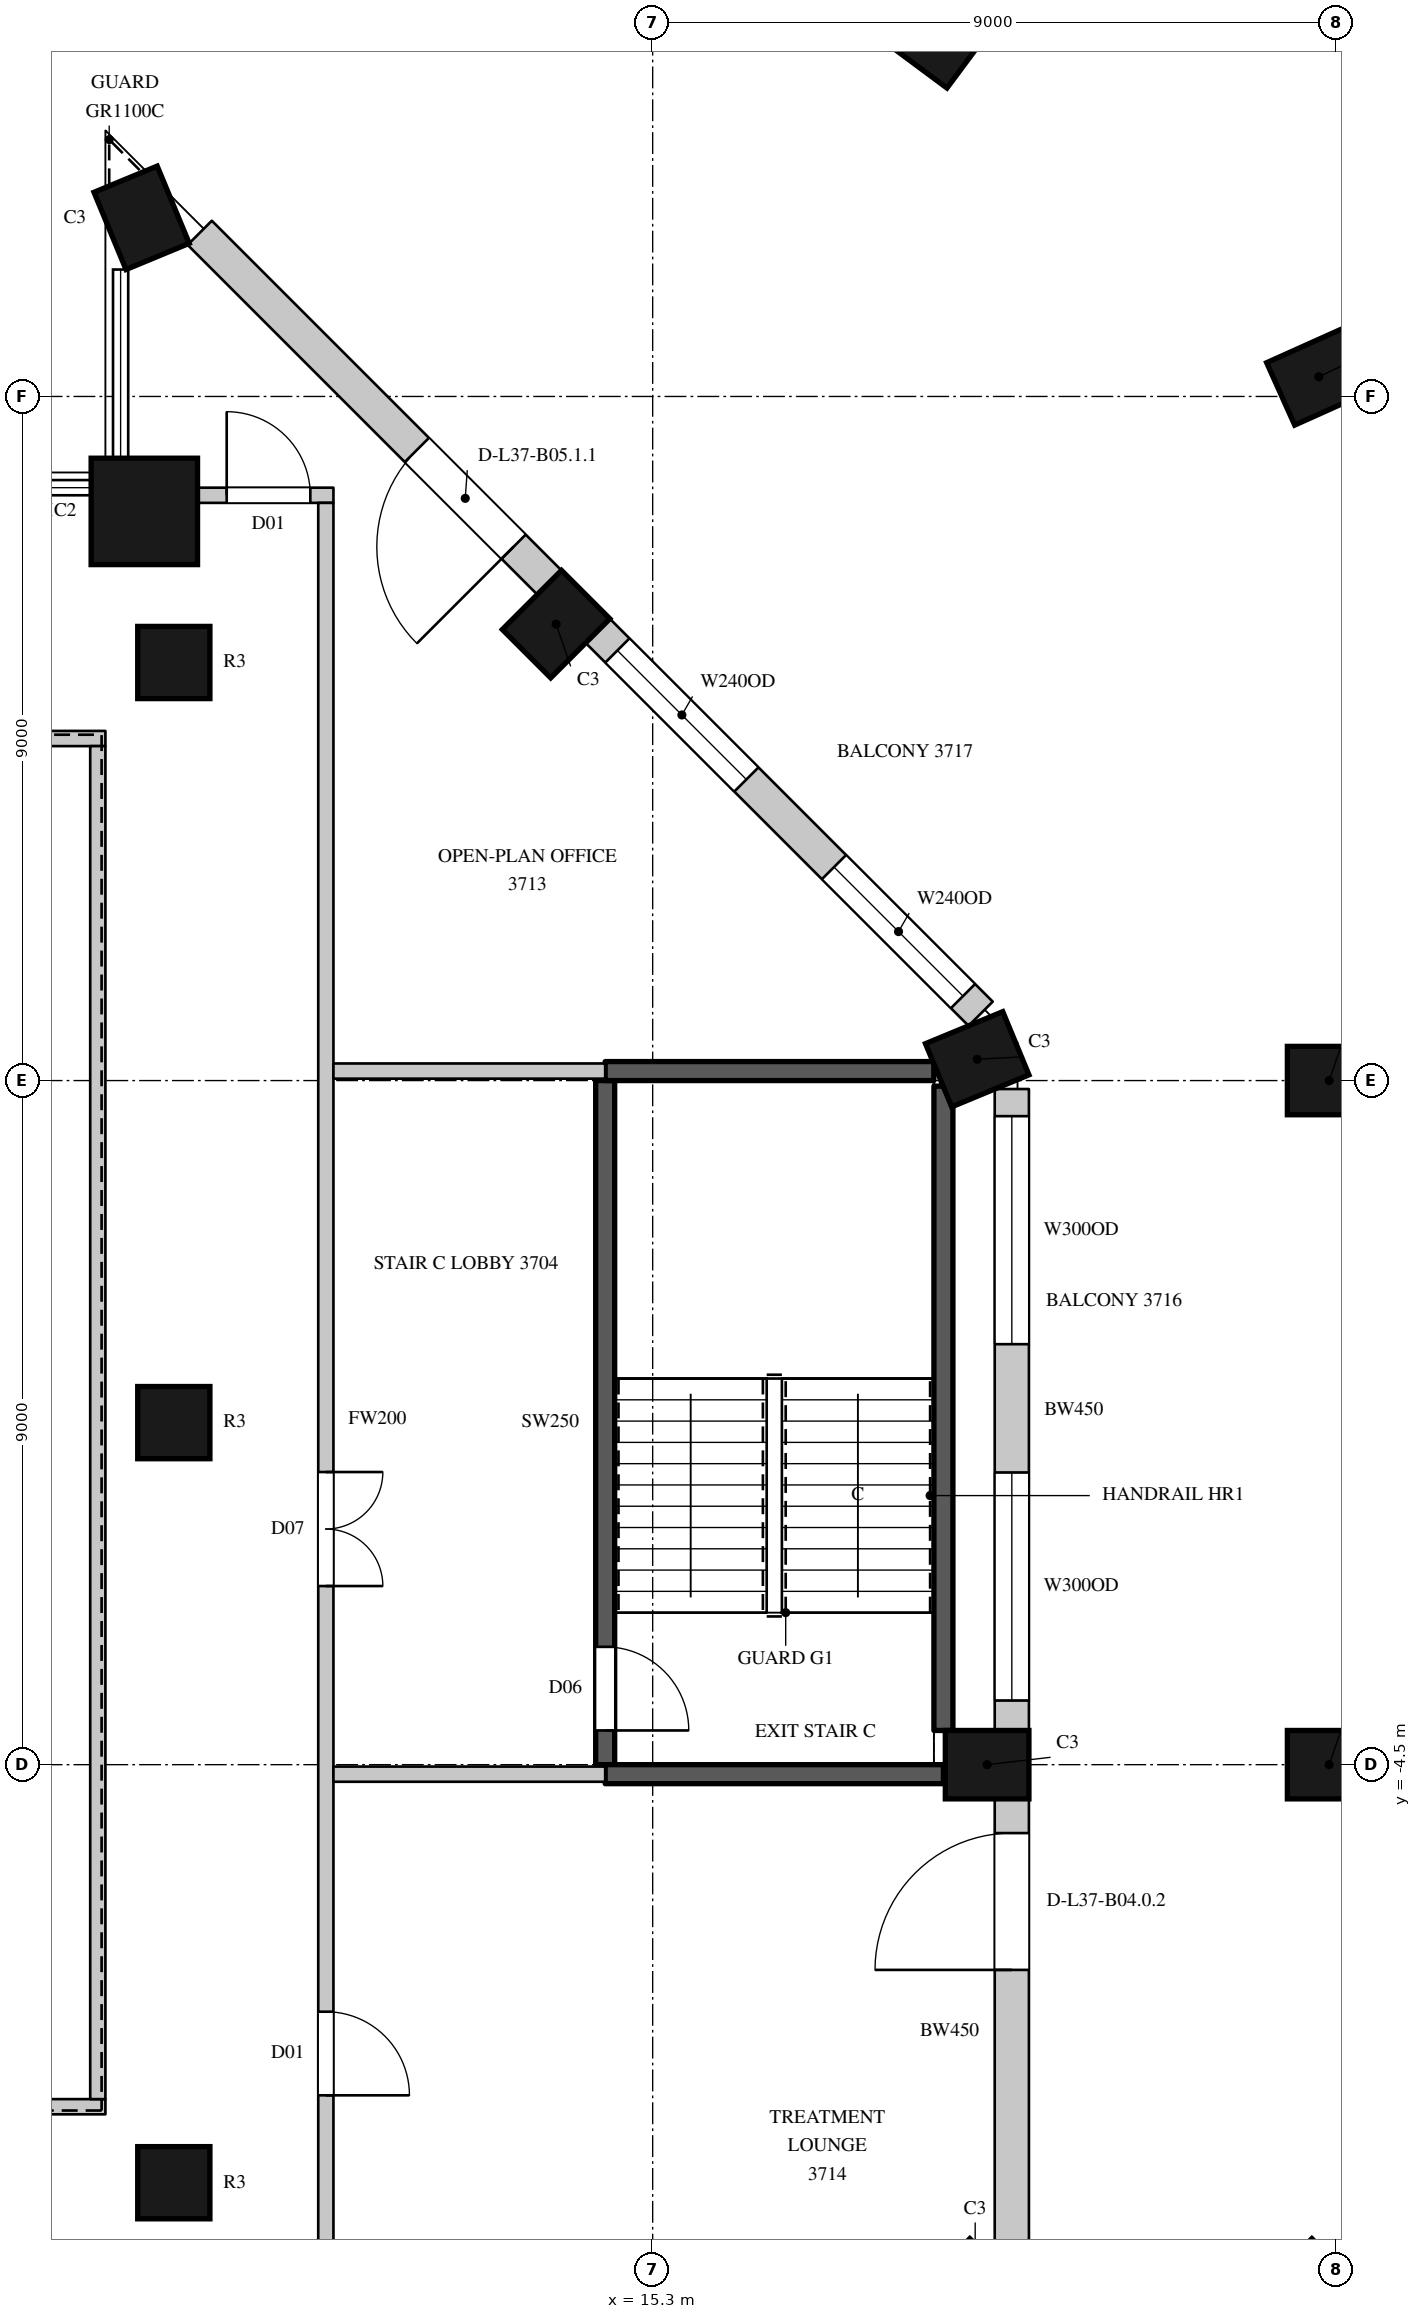
"""IFC4 building model, lengths in metres.
Left out: names, types, materials, properties, quantities, classifications, styles, units other than length and angle.
Written with IfcOpenShell. Run it as: python <this file> out.ifc"""

import sys

from ifc_helpers import new_model, si_unit, direction, frame, frame_2d, origin, origin_2d, place, context, subcontext, project, spatial, rectangle, circle, extrude, element, fill, save


model = new_model("IFC4")
c1 = context("Model", 3, precision=1e-05, world=origin(), true_north=direction((0.0, 1.0)))
c2 = subcontext(c1, "Body", "Model", "MODEL_VIEW")
j1 = project(units=[si_unit("LENGTHUNIT", "METRE"), si_unit("PLANEANGLEUNIT", "RADIAN")], contexts=[c1])
p1 = place(None, origin())
s1 = spatial("IfcSite", under=j1, at=p1, CompositionType="ELEMENT")
p2 = place(p1, origin())
s2 = spatial("IfcBuilding", under=s1, at=p2, CompositionType="ELEMENT")
p3 = place(p2, frame((0.0, 0.0, 172.8)))
s3 = spatial("IfcBuildingStorey", under=s2, at=p3, CompositionType="ELEMENT", Elevation=172.8)
for number, where, z_axis, x_axis in (
    (1, (19.543, -11.443, 0.0), (0.0, 0.0, 1.0), (0.707, 0.707, 0.0)),
    (2, (19.7, -4.5, 0.0), (0.0, 0.0, 1.0), (0.0, 1.0, 0.0)),
    (3, (19.57, 4.78, 0.0), (0.0, 0.0, 1.0), (-0.383, 0.924, 0.0)),
    (4, (14.029, 10.505, 0.0), (0.0, 0.0, 1.0), (-0.707, 0.707, 0.0)),
    (5, (8.576, 15.85, 0.0), (0.0, 0.0, 1.0), (-0.924, -0.383, 0.0)),
):
    element("IfcColumn", number, at=place(p3, frame(where, z_axis=z_axis, x_axis=x_axis)), inside=s3, PredefinedType="COLUMN", context=c2, shape_type="SweptSolid", body=[
        extrude(rectangle(XDim=0.9, YDim=1.1, at=origin_2d()), origin(), (0.0, 0.0, 1.0), 4.1),
    ])
p4 = place(p3, frame((8.612, 11.988, 0.0), z_axis=(0.0, 0.0, 1.0), x_axis=(1.0, 0.0, 0.0)))
e6 = element("IfcColumn", 6, at=p4, inside=s3, PredefinedType="COLUMN", context=c2, shape_type="SweptSolid", body=[
    extrude(circle(Radius=0.7, at=origin_2d()), origin(), (0.0, 0.0, 1.0), 4.1),
])
for number, where, z_axis, x_axis in (
    (7, (24.043, -11.443, 0.0), (0.0, 0.0, 1.0), (0.707, 0.707, 0.0)),
    (8, (24.2, -4.5, 0.0), (0.0, 0.0, 1.0), (0.0, 1.0, 0.0)),
    (9, (24.2, 4.5, 0.0), (0.0, 0.0, 1.0), (0.0, 1.0, 0.0)),
    (10, (24.064, 13.759, 0.0), (0.0, 0.0, 1.0), (-0.41, 0.912, 0.0)),
    (11, (19.138, 18.268, 0.0), (0.0, 0.0, 1.0), (-0.803, 0.596, 0.0)),
):
    element("IfcColumn", number, at=place(p3, frame(where, z_axis=z_axis, x_axis=x_axis)), inside=s3, PredefinedType="COLUMN", context=c2, shape_type="SweptSolid", body=[
        extrude(rectangle(XDim=0.9, YDim=1.1, at=origin_2d()), origin(), (0.0, 0.0, 1.0), 4.1),
    ])
for number, where, z_axis, x_axis in (
    (12, (9.0, -10.0, 0.0), (0.0, 0.0, 1.0), (1.0, 0.0, 0.0)),
    (13, (9.0, 0.0, 0.0), (0.0, 0.0, 1.0), (1.0, 0.0, 0.0)),
    (14, (9.0, 10.0, 0.0), (0.0, 0.0, 1.0), (1.0, 0.0, 0.0)),
):
    element("IfcColumn", number, at=place(p3, frame(where, z_axis=z_axis, x_axis=x_axis)), inside=s3, PredefinedType="COLUMN", context=c2, shape_type="SweptSolid", body=[
        extrude(circle(Radius=0.475, at=origin_2d()), origin(), (0.0, 0.0, 1.0), 4.1),
    ])
p5 = place(p3, frame((20.025, -11.064, 0.0), z_axis=(0.0, 0.0, 1.0), x_axis=(0.0, 1.0, 0.0)))
e15 = element("IfcWall", 15, at=p5, inside=s3, PredefinedType="SOLIDWALL", context=c2, shape_type="SweptSolid", body=[
    extrude(rectangle(XDim=6.114, YDim=0.45, at=frame_2d((3.057, 0.0))), origin(), (0.0, 0.0, 1.0), 3.8),
])
p6 = place(p5, frame((3.864, 0.0, 0.0)))
e16 = element("IfcOpeningElement", 16, at=p6, cuts=e15, PredefinedType="OPENING", context=c2, shape_type="SweptSolid", body=[
    extrude(rectangle(XDim=1.8, YDim=2.4, at=frame_2d((0.9, 1.2))), frame((0.0, 0.235, 0.0), z_axis=(0.0, -1.0, 0.0), x_axis=(1.0, 0.0, 0.0)), (0.0, 0.0, 1.0), 0.47),
])
p7 = place(p3, frame((20.025, -4.05, 0.0), z_axis=(0.0, 0.0, 1.0), x_axis=(0.0, 1.0, 0.0)))
e17 = element("IfcWall", 17, at=p7, inside=s3, PredefinedType="SOLIDWALL", context=c2, shape_type="SweptSolid", body=[
    extrude(rectangle(XDim=8.439, YDim=0.45, at=frame_2d((4.219, 0.0))), origin(), (0.0, 0.0, 1.0), 3.8),
])
p8 = place(p7, frame((0.394, 0.0, 1.05)))
e18 = element("IfcOpeningElement", 18, at=p8, cuts=e17, PredefinedType="OPENING", context=c2, shape_type="SweptSolid", body=[
    extrude(rectangle(XDim=3.0, YDim=2.4, at=frame_2d((1.5, 1.2))), frame((0.0, 0.235, 0.0), z_axis=(0.0, -1.0, 0.0), x_axis=(1.0, 0.0, 0.0)), (0.0, 0.0, 1.0), 0.47),
])
p9 = place(p7, frame((5.082, 0.0, 1.05)))
e19 = element("IfcOpeningElement", 19, at=p9, cuts=e17, PredefinedType="OPENING", context=c2, shape_type="SweptSolid", body=[
    extrude(rectangle(XDim=3.0, YDim=2.4, at=frame_2d((1.5, 1.2))), frame((0.0, 0.235, 0.0), z_axis=(0.0, -1.0, 0.0), x_axis=(1.0, 0.0, 0.0)), (0.0, 0.0, 1.0), 0.47),
])
p10 = place(p3, frame((19.615, 5.379, 0.0), z_axis=(0.0, 0.0, 1.0), x_axis=(-0.707089646058, 0.7071239159, 0.0)))
e20 = element("IfcWall", 20, at=p10, inside=s3, PredefinedType="SOLIDWALL", context=c2, shape_type="SweptSolid", body=[
    extrude(rectangle(XDim=7.124, YDim=0.45, at=frame_2d((3.562, 0.0))), origin(), (0.0, 0.0, 1.0), 3.8),
])
p11 = place(p10, frame((0.328, 0.0, 1.05)))
e21 = element("IfcOpeningElement", 21, at=p11, cuts=e20, PredefinedType="OPENING", context=c2, shape_type="SweptSolid", body=[
    extrude(rectangle(XDim=2.4, YDim=2.4, at=frame_2d((1.2, 1.2))), frame((0.0, 0.235, 0.0), z_axis=(0.0, -1.0, 0.0), x_axis=(1.0, 0.0, 0.0)), (0.0, 0.0, 1.0), 0.47),
])
p12 = place(p10, frame((4.359, 0.0, 1.05)))
e22 = element("IfcOpeningElement", 22, at=p12, cuts=e20, PredefinedType="OPENING", context=c2, shape_type="SweptSolid", body=[
    extrude(rectangle(XDim=2.4, YDim=2.4, at=frame_2d((1.2, 1.2))), frame((0.0, 0.235, 0.0), z_axis=(0.0, -1.0, 0.0), x_axis=(1.0, 0.0, 0.0)), (0.0, 0.0, 1.0), 0.47),
])
p13 = place(p3, frame((13.941, 11.053, 0.0), z_axis=(0.0, 0.0, 1.0), x_axis=(-0.707106781187, 0.707106781187, 0.0)))
e23 = element("IfcWall", 23, at=p13, inside=s3, PredefinedType="SOLIDWALL", context=c2, shape_type="SweptSolid", body=[
    extrude(rectangle(XDim=6.505, YDim=0.45, at=frame_2d((3.252, 0.0))), origin(), (0.0, 0.0, 1.0), 3.8),
])
p14 = place(p13, frame((0.665, 0.0, 0.0)))
e24 = element("IfcOpeningElement", 24, at=p14, cuts=e23, PredefinedType="OPENING", context=c2, shape_type="SweptSolid", body=[
    extrude(rectangle(XDim=1.8, YDim=2.4, at=frame_2d((0.9, 1.2))), frame((0.0, 0.235, 0.0), z_axis=(0.0, -1.0, 0.0), x_axis=(1.0, 0.0, 0.0)), (0.0, 0.0, 1.0), 0.47),
])
p15 = place(p3, frame((21.1, -5.1, 0.0), z_axis=(0.0, 0.0, 1.0), x_axis=(0.0, 1.0, 0.0)))
e25 = element("IfcWall", 25, at=p15, inside=s3, PredefinedType="SOLIDWALL", context=c2, shape_type="SweptSolid", body=[
    extrude(rectangle(XDim=3.583, YDim=0.45, at=frame_2d((1.792, 0.0))), origin(), (0.0, 0.0, 1.0), 0.6),
])
p16 = place(p3, frame((21.1, -0.617, 0.0), z_axis=(0.0, 0.0, 1.0), x_axis=(0.0, 1.0, 0.0)))
e26 = element("IfcWall", 26, at=p16, inside=s3, PredefinedType="SOLIDWALL", context=c2, shape_type="SweptSolid", body=[
    extrude(rectangle(XDim=2.567, YDim=0.45, at=frame_2d((1.283, 0.0))), origin(), (0.0, 0.0, 1.0), 0.6),
])
p17 = place(p3, frame((18.65, 7.864, 0.0), z_axis=(0.0, 0.0, 1.0), x_axis=(-0.707059037574, 0.707154521576, 0.0)))
e27 = element("IfcWall", 27, at=p17, inside=s3, PredefinedType="SOLIDWALL", context=c2, shape_type="SweptSolid", body=[
    extrude(rectangle(XDim=2.557, YDim=0.45, at=frame_2d((1.278, 0.0))), origin(), (0.0, 0.0, 1.0), 0.6),
])
p18 = place(p3, frame((16.206, 10.308, 0.0), z_axis=(0.0, 0.0, 1.0), x_axis=(-0.707057827829, 0.707155731156, 0.0)))
e28 = element("IfcWall", 28, at=p18, inside=s3, PredefinedType="SOLIDWALL", context=c2, shape_type="SweptSolid", body=[
    extrude(rectangle(XDim=2.494, YDim=0.45, at=frame_2d((1.247, 0.0))), origin(), (0.0, 0.0, 1.0), 0.6),
])
p19 = place(p3, frame((12.251, 14.263, 0.0), z_axis=(0.0, 0.0, 1.0), x_axis=(-0.707039709166, 0.707173846846, 0.0)))
e29 = element("IfcWall", 29, at=p19, inside=s3, PredefinedType="SOLIDWALL", context=c2, shape_type="SweptSolid", body=[
    extrude(rectangle(XDim=1.82, YDim=0.45, at=frame_2d((0.91, 0.0))), origin(), (0.0, 0.0, 1.0), 0.6),
])
for number, where, z_axis, x_axis in (
    (30, (-2.48, -9.0, 0.0), (0.0, 0.0, 1.0), (1.0, 0.0, 0.0)),
    (31, (-2.48, 9.0, 0.0), (0.0, 0.0, 1.0), (1.0, 0.0, 0.0)),
):
    element("IfcWall", number, at=place(p3, frame(where, z_axis=z_axis, x_axis=x_axis)), inside=s3, PredefinedType="PARTITIONING", context=c2, shape_type="SweptSolid", body=[
        extrude(rectangle(XDim=10.58, YDim=0.2, at=frame_2d((5.29, 0.0))), origin(), (0.0, 0.0, 1.0), 3.8),
    ])
p20 = place(p3, frame((8.0, -8.9, 0.0), z_axis=(0.0, 0.0, 1.0), x_axis=(0.0, 1.0, 0.0)))
e32 = element("IfcWall", 32, at=p20, inside=s3, PredefinedType="PARTITIONING", context=c2, shape_type="SweptSolid", body=[
    extrude(rectangle(XDim=17.8, YDim=0.2, at=frame_2d((8.9, 0.0))), origin(), (0.0, 0.0, 1.0), 3.8),
])
p21 = place(p3, frame((9.296, 12.2, 0.0), z_axis=(0.0, 0.0, 1.0), x_axis=(1.0, 0.0, 0.0)))
e33 = element("IfcWall", 33, at=p21, inside=s3, PredefinedType="PARTITIONING", context=c2, shape_type="SweptSolid", body=[
    extrude(rectangle(XDim=1.804, YDim=0.2, at=frame_2d((0.902, 0.0))), origin(), (0.0, 0.0, 1.0), 3.8),
])
p22 = place(p21, frame((0.4, 0.0, 0.0)))
e34 = element("IfcOpeningElement", 34, at=p22, cuts=e33, PredefinedType="OPENING", context=c2, shape_type="SweptSolid", body=[
    extrude(rectangle(XDim=1.1, YDim=2.4, at=frame_2d((0.55, 1.2))), frame((0.0, 0.11, 0.0), z_axis=(0.0, -1.0, 0.0), x_axis=(1.0, 0.0, 0.0)), (0.0, 0.0, 1.0), 0.22),
])
p23 = place(p3, frame((11.0, -12.0, 0.0), z_axis=(0.0, 0.0, 1.0), x_axis=(0.0, 1.0, 0.0)))
e35 = element("IfcWall", 35, at=p23, inside=s3, PredefinedType="PARTITIONING", context=c2, shape_type="SweptSolid", body=[
    extrude(rectangle(XDim=24.1, YDim=0.2, at=frame_2d((12.05, 0.0))), origin(), (0.0, 0.0, 1.0), 3.8),
])
p24 = place(p23, frame((9.85, 0.0, 0.0)))
e36 = element("IfcOpeningElement", 36, at=p24, cuts=e35, PredefinedType="OPENING", context=c2, shape_type="SweptSolid", body=[
    extrude(rectangle(XDim=1.5, YDim=2.4, at=frame_2d((0.75, 1.2))), frame((0.0, 0.11, 0.0), z_axis=(0.0, -1.0, 0.0), x_axis=(1.0, 0.0, 0.0)), (0.0, 0.0, 1.0), 0.22),
])
p25 = place(p23, frame((3.15, 0.0, 0.0)))
e37 = element("IfcOpeningElement", 37, at=p25, cuts=e35, PredefinedType="OPENING", context=c2, shape_type="SweptSolid", body=[
    extrude(rectangle(XDim=1.1, YDim=2.4, at=frame_2d((0.55, 1.2))), frame((0.0, 0.11, 0.0), z_axis=(0.0, -1.0, 0.0), x_axis=(1.0, 0.0, 0.0)), (0.0, 0.0, 1.0), 0.22),
])
for number, where, z_axis, x_axis in (
    (38, (11.1, -4.625, 0.0), (0.0, 0.0, 1.0), (1.0, 0.0, 0.0)),
    (39, (11.1, 4.625, 0.0), (0.0, 0.0, 1.0), (1.0, 0.0, 0.0)),
):
    element("IfcWall", number, at=place(p3, frame(where, z_axis=z_axis, x_axis=x_axis)), inside=s3, PredefinedType="PARTITIONING", context=c2, shape_type="SweptSolid", body=[
        extrude(rectangle(XDim=3.575, YDim=0.2, at=frame_2d((1.788, 0.0))), origin(), (0.0, 0.0, 1.0), 3.8),
    ])
p26 = place(p3, frame((14.675, -4.5, 0.0), z_axis=(0.0, 0.0, 1.0), x_axis=(0.0, 1.0, 0.0)))
e40 = element("IfcWall", 40, at=p26, inside=s3, PredefinedType="SHEAR", context=c2, shape_type="SweptSolid", body=[
    extrude(rectangle(XDim=9.0, YDim=0.25, at=frame_2d((4.5, 0.0))), origin(), (0.0, 0.0, 1.0), 3.8),
])
p27 = place(p26, frame((0.45, 0.0, 0.0)))
e41 = element("IfcOpeningElement", 41, at=p27, cuts=e40, PredefinedType="OPENING", context=c2, shape_type="SweptSolid", body=[
    extrude(rectangle(XDim=1.1, YDim=2.2, at=frame_2d((0.55, 1.1))), frame((0.0, 0.135, 0.0), z_axis=(0.0, -1.0, 0.0), x_axis=(1.0, 0.0, 0.0)), (0.0, 0.0, 1.0), 0.27),
])
p28 = place(p3, frame((14.675, -4.625, 0.0), z_axis=(0.0, 0.0, 1.0), x_axis=(1.0, 0.0, 0.0)))
e42 = element("IfcWall", 42, at=p28, inside=s3, PredefinedType="SHEAR", context=c2, shape_type="SweptSolid", body=[
    extrude(rectangle(XDim=4.45, YDim=0.25, at=frame_2d((2.225, 0.0))), origin(), (0.0, 0.0, 1.0), 3.8),
])
p29 = place(p3, frame((14.675, 4.625, 0.0), z_axis=(0.0, 0.0, 1.0), x_axis=(1.0, 0.0, 0.0)))
e43 = element("IfcWall", 43, at=p29, inside=s3, PredefinedType="SHEAR", context=c2, shape_type="SweptSolid", body=[
    extrude(rectangle(XDim=4.324, YDim=0.25, at=frame_2d((2.162, 0.0))), origin(), (0.0, 0.0, 1.0), 3.8),
])
p30 = place(p3, frame((19.125, -4.05, 0.0), z_axis=(0.0, 0.0, 1.0), x_axis=(0.0, 1.0, 0.0)))
e44 = element("IfcWall", 44, at=p30, inside=s3, PredefinedType="SHEAR", context=c2, shape_type="SweptSolid", body=[
    extrude(rectangle(XDim=8.477, YDim=0.25, at=frame_2d((4.238, 0.0))), origin(), (0.0, 0.0, 1.0), 3.8),
])
p31 = place(p6, origin())
e45 = element("IfcDoor", 45, at=p31, inside=s3, OperationType="SLIDING_TO_LEFT", PredefinedType="DOOR", context=c2, shape_type="SweptSolid", body=[
    extrude(rectangle(XDim=1.8, YDim=2.4, at=frame_2d((0.9, 1.2))), frame((0.0, 0.13, 0.0), z_axis=(0.0, -1.0, 0.0), x_axis=(1.0, 0.0, 0.0)), (0.0, 0.0, 1.0), 0.05),
])
fill(e16, e45)
p32 = place(p8, origin())
e46 = element("IfcWindow", 46, at=p32, inside=s3, PartitioningType="SINGLE_PANEL", PredefinedType="WINDOW", context=c2, shape_type="SweptSolid", body=[
    extrude(rectangle(XDim=3.0, YDim=2.4, at=frame_2d((1.5, 1.2))), frame((0.0, 0.135, 0.0), z_axis=(0.0, -1.0, 0.0), x_axis=(1.0, 0.0, 0.0)), (0.0, 0.0, 1.0), 0.06),
])
fill(e18, e46)
p33 = place(p9, origin())
e47 = element("IfcWindow", 47, at=p33, inside=s3, PartitioningType="SINGLE_PANEL", PredefinedType="WINDOW", context=c2, shape_type="SweptSolid", body=[
    extrude(rectangle(XDim=3.0, YDim=2.4, at=frame_2d((1.5, 1.2))), frame((0.0, 0.135, 0.0), z_axis=(0.0, -1.0, 0.0), x_axis=(1.0, 0.0, 0.0)), (0.0, 0.0, 1.0), 0.06),
])
fill(e19, e47)
p34 = place(p11, origin())
e48 = element("IfcWindow", 48, at=p34, inside=s3, PartitioningType="SINGLE_PANEL", PredefinedType="WINDOW", context=c2, shape_type="SweptSolid", body=[
    extrude(rectangle(XDim=2.4, YDim=2.4, at=frame_2d((1.2, 1.2))), frame((0.0, 0.135, 0.0), z_axis=(0.0, -1.0, 0.0), x_axis=(1.0, 0.0, 0.0)), (0.0, 0.0, 1.0), 0.06),
])
fill(e21, e48)
p35 = place(p12, origin())
e49 = element("IfcWindow", 49, at=p35, inside=s3, PartitioningType="SINGLE_PANEL", PredefinedType="WINDOW", context=c2, shape_type="SweptSolid", body=[
    extrude(rectangle(XDim=2.4, YDim=2.4, at=frame_2d((1.2, 1.2))), frame((0.0, 0.135, 0.0), z_axis=(0.0, -1.0, 0.0), x_axis=(1.0, 0.0, 0.0)), (0.0, 0.0, 1.0), 0.06),
])
fill(e22, e49)
p36 = place(p14, origin())
e50 = element("IfcDoor", 50, at=p36, inside=s3, OperationType="SLIDING_TO_LEFT", PredefinedType="DOOR", context=c2, shape_type="SweptSolid", body=[
    extrude(rectangle(XDim=1.8, YDim=2.4, at=frame_2d((0.9, 1.2))), frame((0.0, 0.13, 0.0), z_axis=(0.0, -1.0, 0.0), x_axis=(1.0, 0.0, 0.0)), (0.0, 0.0, 1.0), 0.05),
])
fill(e24, e50)
p37 = place(p24, origin())
e51 = element("IfcDoor", 51, at=p37, inside=s3, OperationType="DOUBLE_DOOR_SINGLE_SWING", PredefinedType="DOOR", context=c2, shape_type="SweptSolid", body=[
    extrude(rectangle(XDim=1.5, YDim=2.4, at=frame_2d((0.75, 1.2))), frame((0.0, 0.025, 0.0), z_axis=(0.0, -1.0, 0.0), x_axis=(1.0, 0.0, 0.0)), (0.0, 0.0, 1.0), 0.05),
])
fill(e36, e51)
p38 = place(p22, origin())
e52 = element("IfcDoor", 52, at=p38, inside=s3, OperationType="SINGLE_SWING_LEFT", PredefinedType="DOOR", context=c2, shape_type="SweptSolid", body=[
    extrude(rectangle(XDim=1.1, YDim=2.4, at=frame_2d((0.55, 1.2))), frame((0.0, 0.025, 0.0), z_axis=(0.0, -1.0, 0.0), x_axis=(1.0, 0.0, 0.0)), (0.0, 0.0, 1.0), 0.05),
])
fill(e34, e52)
p39 = place(p25, origin())
e53 = element("IfcDoor", 53, at=p39, inside=s3, OperationType="SINGLE_SWING_RIGHT", PredefinedType="DOOR", context=c2, shape_type="SweptSolid", body=[
    extrude(rectangle(XDim=1.1, YDim=2.4, at=frame_2d((0.55, 1.2))), frame((0.0, 0.025, 0.0), z_axis=(0.0, -1.0, 0.0), x_axis=(1.0, 0.0, 0.0)), (0.0, 0.0, 1.0), 0.05),
])
fill(e37, e53)
p40 = place(p27, origin())
e54 = element("IfcDoor", 54, at=p40, inside=s3, OperationType="SINGLE_SWING_RIGHT", PredefinedType="DOOR", context=c2, shape_type="SweptSolid", body=[
    extrude(rectangle(XDim=1.1, YDim=2.2, at=frame_2d((0.55, 1.1))), frame((0.0, 0.025, 0.0), z_axis=(0.0, -1.0, 0.0), x_axis=(1.0, 0.0, 0.0)), (0.0, 0.0, 1.0), 0.05),
])
fill(e41, e54)
save(model, sys.argv[1])
